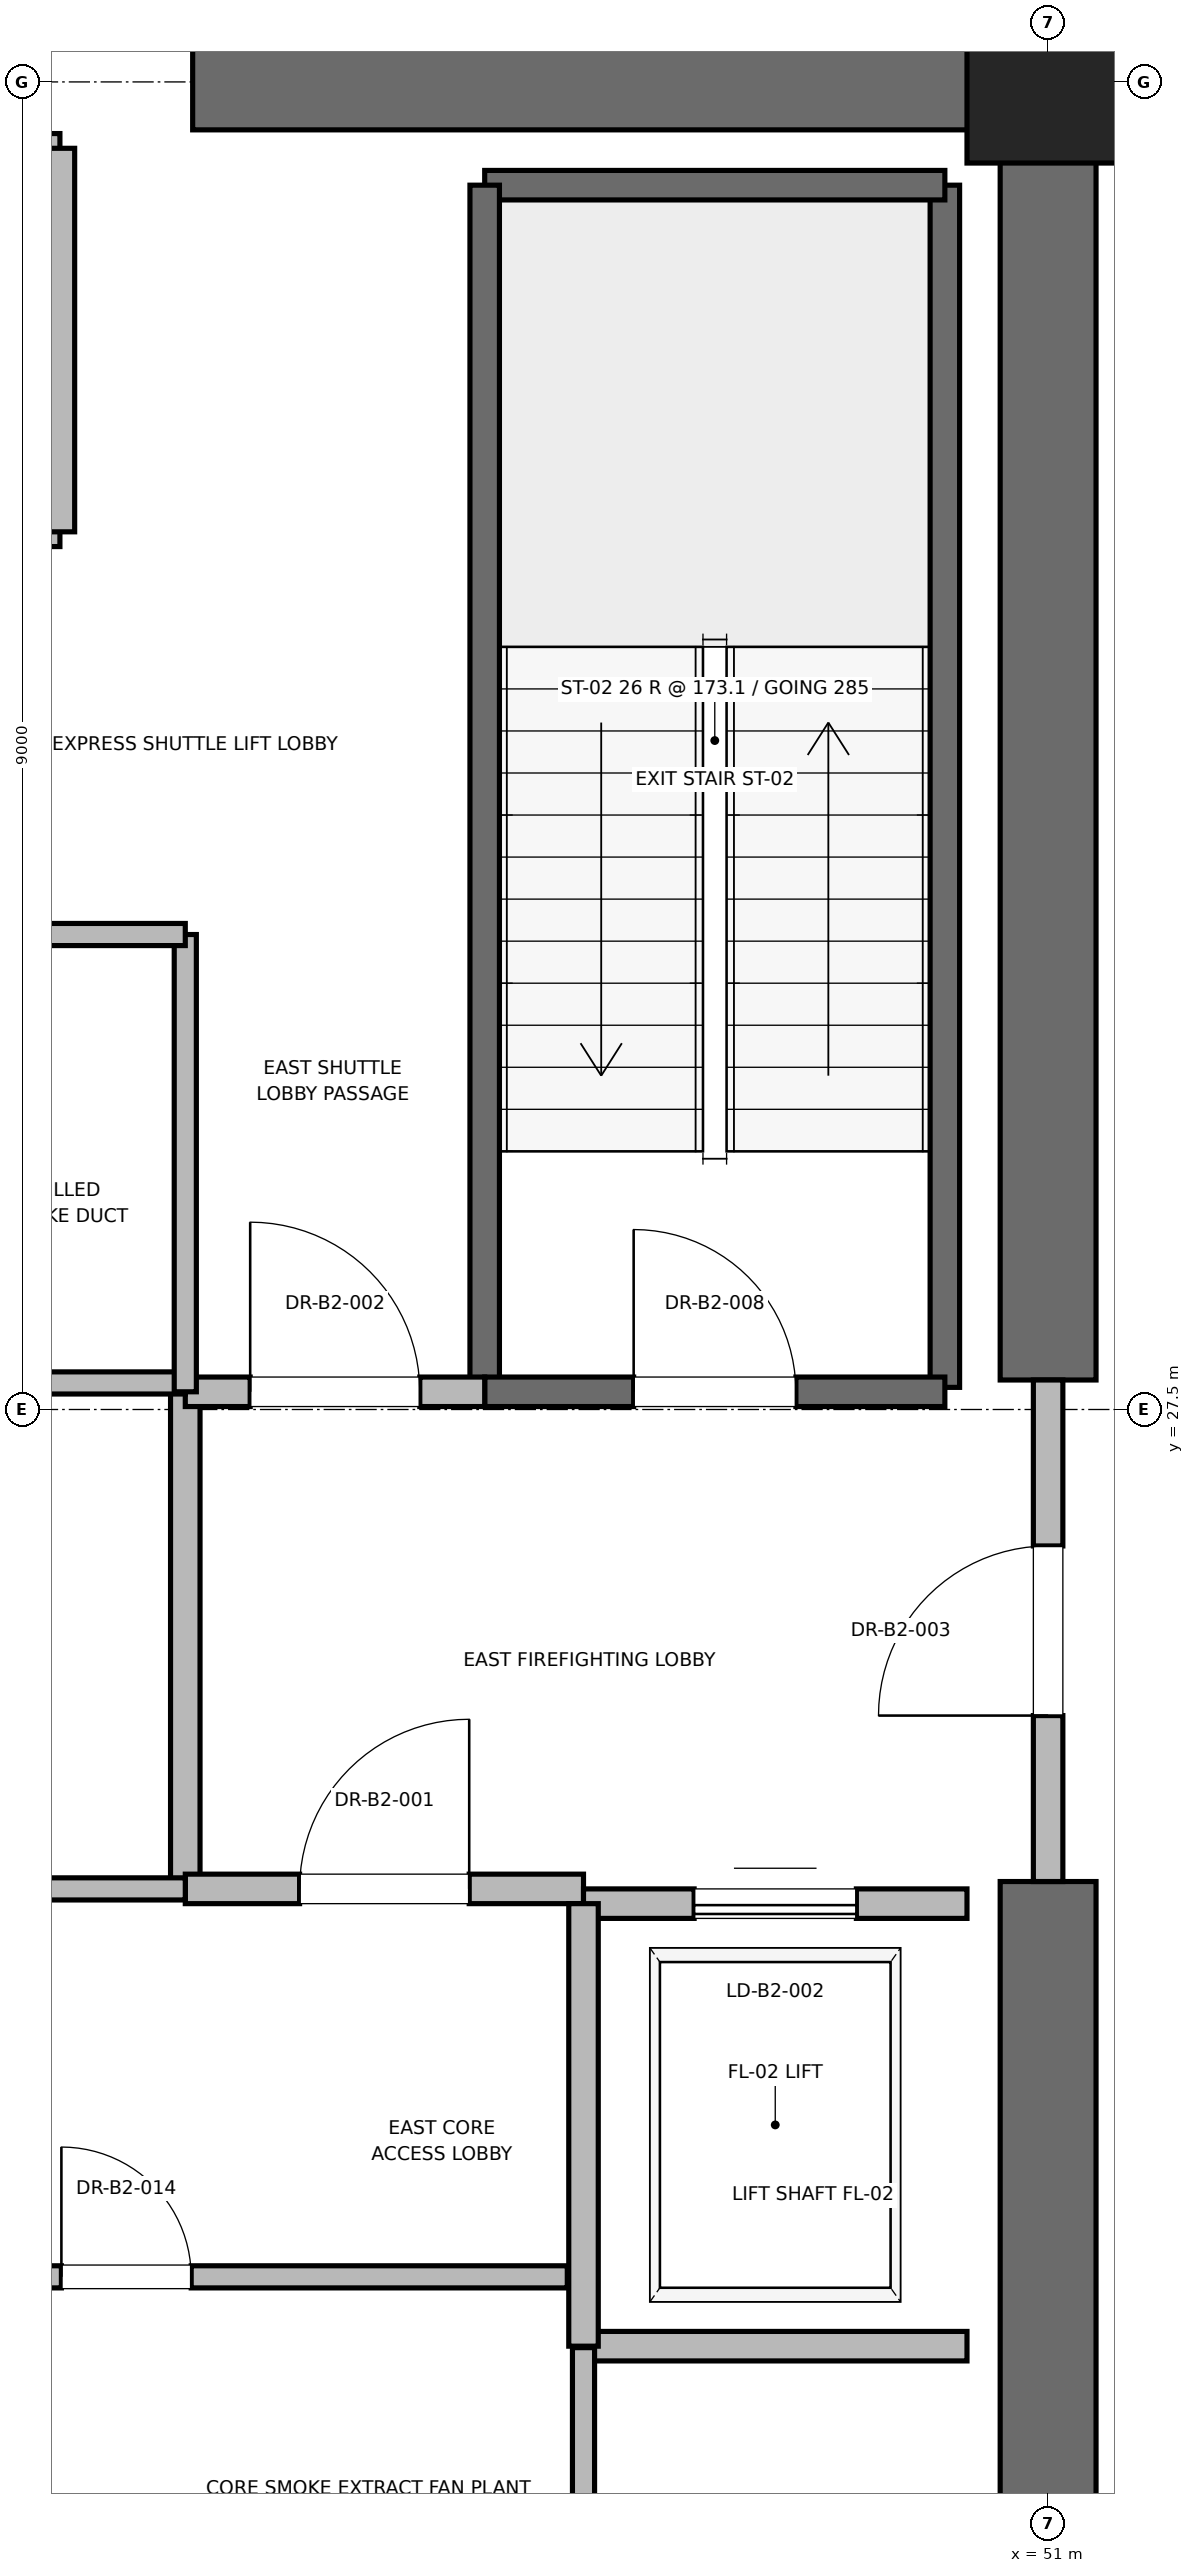
"""IFC4 building model, lengths in metres.
Left out: names, types, materials, properties, quantities, classifications, styles, units other than length and angle.
Written with IfcOpenShell. Run it as: python <this file> out.ifc"""

import sys

from ifc_helpers import new_model, si_unit, direction, frame, frame_2d, origin, origin_2d, place, context, subcontext, project, spatial, rectangle, extrude, element, fill, save


model = new_model("IFC4")
c1 = context("Model", 3, precision=1e-05, world=origin(), true_north=direction((0.0, 1.0)))
c2 = subcontext(c1, "Body", "Model", "MODEL_VIEW")
j1 = project(units=[si_unit("LENGTHUNIT", "METRE"), si_unit("PLANEANGLEUNIT", "RADIAN")], contexts=[c1])
p1 = place(None, origin())
s1 = spatial("IfcSite", under=j1, at=p1, CompositionType="ELEMENT")
p2 = place(p1, origin())
s2 = spatial("IfcBuilding", under=s1, at=p2, CompositionType="ELEMENT")
p3 = place(p2, frame((0.0, 0.0, -9.0)))
s3 = spatial("IfcBuildingStorey", under=s2, at=p3, CompositionType="ELEMENT", Elevation=-9.0)
p4 = place(p3, frame((51.0, 36.5, -0.3), z_axis=(0.0, 0.0, 1.0), x_axis=(1.0, 0.0, 0.0)))
e1 = element("IfcColumn", 1, at=p4, inside=s3, PredefinedType="PILASTER", context=c2, shape_type="SweptSolid", body=[
    extrude(rectangle(XDim=1.1, YDim=1.1, at=origin_2d()), origin(), (0.0, 0.0, 1.0), 4.8),
])
for number, where, z_axis, x_axis in (
    (2, (45.2, 36.5, -0.3), (0.0, 0.0, 1.0), (1.0, 0.0, 0.0)),
    (3, (51.0, 18.5, -0.3), (0.0, 0.0, 1.0), (0.0, 1.0, 0.0)),
):
    element("IfcWall", number, at=place(p3, frame(where, z_axis=z_axis, x_axis=x_axis)), inside=s3, PredefinedType="SHEAR", context=c2, shape_type="SweptSolid", body=[
        extrude(rectangle(XDim=5.8, YDim=0.65, at=frame_2d((2.9, 0.0))), origin(), (0.0, 0.0, 1.0), 4.5),
    ])
p5 = place(p3, frame((51.0, 27.7, -0.3), z_axis=(0.0, 0.0, 1.0), x_axis=(0.0, 1.0, 0.0)))
e4 = element("IfcWall", 4, at=p5, inside=s3, PredefinedType="SHEAR", context=c2, shape_type="SweptSolid", body=[
    extrude(rectangle(XDim=8.8, YDim=0.65, at=frame_2d((4.4, 0.0))), origin(), (0.0, 0.0, 1.0), 4.5),
])
p6 = place(p3, frame((50.3, 27.65, -0.3), z_axis=(0.0, 0.0, 1.0), x_axis=(0.0, 1.0, 0.0)))
e5 = element("IfcWall", 5, at=p6, inside=s3, PredefinedType="SOLIDWALL", context=c2, shape_type="SweptSolid", body=[
    extrude(rectangle(XDim=8.15, YDim=0.2, at=frame_2d((4.075, 0.0))), origin(), (0.0, 0.0, 1.0), 4.5),
])
p7 = place(p3, frame((47.18, 35.8, -0.3), z_axis=(0.0, 0.0, 1.0), x_axis=(1.0, 0.0, 0.0)))
e6 = element("IfcWall", 6, at=p7, inside=s3, PredefinedType="SOLIDWALL", context=c2, shape_type="SweptSolid", body=[
    extrude(rectangle(XDim=3.12, YDim=0.2, at=frame_2d((1.56, 0.0))), origin(), (0.0, 0.0, 1.0), 4.5),
])
p8 = place(p3, frame((47.18, 27.62, -0.3), z_axis=(0.0, 0.0, 1.0), x_axis=(0.0, 1.0, 0.0)))
e7 = element("IfcWall", 7, at=p8, inside=s3, PredefinedType="SOLIDWALL", context=c2, shape_type="SweptSolid", body=[
    extrude(rectangle(XDim=8.18, YDim=0.2, at=frame_2d((4.09, 0.0))), origin(), (0.0, 0.0, 1.0), 4.5),
])
p9 = place(p3, frame((47.18, 27.62, -0.3), z_axis=(0.0, 0.0, 1.0), x_axis=(1.0, 0.0, 0.0)))
e8 = element("IfcWall", 8, at=p9, inside=s3, PredefinedType="SOLIDWALL", context=c2, shape_type="SweptSolid", body=[
    extrude(rectangle(XDim=3.12, YDim=0.2, at=frame_2d((1.56, 0.0))), origin(), (0.0, 0.0, 1.0), 4.5),
])
p10 = place(p9, frame((1.01, 0.0, 0.3)))
e9 = element("IfcOpeningElement", 9, at=p10, cuts=e8, PredefinedType="OPENING", context=c2, shape_type="SweptSolid", body=[
    extrude(rectangle(XDim=1.1, YDim=2.15, at=frame_2d((0.55, 1.075))), frame((0.0, 0.1, 0.0), z_axis=(0.0, -1.0, 0.0), x_axis=(1.0, 0.0, 0.0)), (0.0, 0.0, 1.0), 0.2),
])
p11 = place(p3, frame((45.15, 24.25, 0.0), z_axis=(0.0, 0.0, 1.0), x_axis=(0.0, 1.0, 0.0)))
e10 = element("IfcWall", 10, at=p11, inside=s3, PredefinedType="PARTITIONING", context=c2, shape_type="SweptSolid", body=[
    extrude(rectangle(XDim=3.37, YDim=0.2, at=frame_2d((1.685, 0.0))), origin(), (0.0, 0.0, 1.0), 4.2),
])
p12 = place(p3, frame((45.15, 24.25, 0.0), z_axis=(0.0, 0.0, 1.0), x_axis=(1.0, 0.0, 0.0)))
e11 = element("IfcWall", 11, at=p12, inside=s3, PredefinedType="PARTITIONING", context=c2, shape_type="SweptSolid", body=[
    extrude(rectangle(XDim=2.7, YDim=0.2, at=frame_2d((1.35, 0.0))), origin(), (0.0, 0.0, 1.0), 4.2),
])
p13 = place(p12, frame((0.775, 0.0, 0.0)))
e12 = element("IfcOpeningElement", 12, at=p13, cuts=e11, PredefinedType="OPENING", context=c2, shape_type="SweptSolid", body=[
    extrude(rectangle(XDim=1.15, YDim=2.2, at=frame_2d((0.575, 1.1))), frame((0.0, 0.1, 0.0), z_axis=(0.0, -1.0, 0.0), x_axis=(1.0, 0.0, 0.0)), (0.0, 0.0, 1.0), 0.2),
])
p14 = place(p3, frame((45.15, 27.62, 0.0), z_axis=(0.0, 0.0, 1.0), x_axis=(1.0, 0.0, 0.0)))
e13 = element("IfcWall", 13, at=p14, inside=s3, PredefinedType="PARTITIONING", context=c2, shape_type="SweptSolid", body=[
    extrude(rectangle(XDim=2.03, YDim=0.2, at=frame_2d((1.015, 0.0))), origin(), (0.0, 0.0, 1.0), 4.2),
])
p15 = place(p14, frame((0.44, 0.0, 0.0)))
e14 = element("IfcOpeningElement", 14, at=p15, cuts=e13, PredefinedType="OPENING", context=c2, shape_type="SweptSolid", body=[
    extrude(rectangle(XDim=1.15, YDim=2.2, at=frame_2d((0.575, 1.1))), frame((0.0, 0.1, 0.0), z_axis=(0.0, -1.0, 0.0), x_axis=(1.0, 0.0, 0.0)), (0.0, 0.0, 1.0), 0.2),
])
p16 = place(p3, frame((51.0, 24.3, 0.0), z_axis=(0.0, 0.0, 1.0), x_axis=(0.0, 1.0, 0.0)))
e15 = element("IfcWall", 15, at=p16, inside=s3, PredefinedType="PARTITIONING", context=c2, shape_type="SweptSolid", body=[
    extrude(rectangle(XDim=3.4, YDim=0.2, at=frame_2d((1.7, 0.0))), origin(), (0.0, 0.0, 1.0), 2.98),
])
p17 = place(p16, frame((1.125, 0.0, 0.0)))
e16 = element("IfcOpeningElement", 16, at=p17, cuts=e15, PredefinedType="OPENING", context=c2, shape_type="SweptSolid", body=[
    extrude(rectangle(XDim=1.15, YDim=2.2, at=frame_2d((0.575, 1.1))), frame((0.0, 0.1, 0.0), z_axis=(0.0, -1.0, 0.0), x_axis=(1.0, 0.0, 0.0)), (0.0, 0.0, 1.0), 0.2),
])
p18 = place(p3, frame((47.85, 21.15, 0.0), z_axis=(0.0, 0.0, 1.0), x_axis=(1.0, 0.0, 0.0)))
e17 = element("IfcWall", 17, at=p18, inside=s3, PredefinedType="SOLIDWALL", context=c2, shape_type="SweptSolid", body=[
    extrude(rectangle(XDim=2.6, YDim=0.2, at=frame_2d((1.3, 0.0))), origin(), (0.0, 0.0, 1.0), 4.2),
])
p19 = place(p3, frame((50.45, 24.15, 0.0), z_axis=(0.0, 0.0, 1.0), x_axis=(-1.0, 0.0, 0.0)))
e18 = element("IfcWall", 18, at=p19, inside=s3, PredefinedType="SOLIDWALL", context=c2, shape_type="SweptSolid", body=[
    extrude(rectangle(XDim=2.6, YDim=0.2, at=frame_2d((1.3, 0.0))), origin(), (0.0, 0.0, 1.0), 2.98),
])
p20 = place(p19, frame((0.75, 0.0, 0.0)))
e19 = element("IfcOpeningElement", 19, at=p20, cuts=e18, PredefinedType="OPENING", context=c2, shape_type="SweptSolid", body=[
    extrude(rectangle(XDim=1.1, YDim=2.2, at=frame_2d((0.55, 1.1))), frame((0.0, 0.1, 0.0), z_axis=(0.0, -1.0, 0.0), x_axis=(1.0, 0.0, 0.0)), (0.0, 0.0, 1.0), 0.2),
])
p21 = place(p3, frame((47.85, 24.15, 0.0), z_axis=(0.0, 0.0, 1.0), x_axis=(0.0, -1.0, 0.0)))
e20 = element("IfcWall", 20, at=p21, inside=s3, PredefinedType="SOLIDWALL", context=c2, shape_type="SweptSolid", body=[
    extrude(rectangle(XDim=3.0, YDim=0.2, at=frame_2d((1.5, 0.0))), origin(), (0.0, 0.0, 1.0), 4.2),
])
p22 = place(p3, frame((42.0, 33.45, 0.0), z_axis=(0.0, 0.0, 1.0), x_axis=(1.0, 0.0, 0.0)))
e21 = element("IfcWall", 21, at=p22, inside=s3, PredefinedType="SOLIDWALL", context=c2, shape_type="SweptSolid", body=[
    extrude(rectangle(XDim=2.3, YDim=0.2, at=frame_2d((1.15, 0.0))), origin(), (0.0, 0.0, 1.0), 4.2),
])
p23 = place(p22, frame((0.6, 0.0, 0.0)))
e22 = element("IfcOpeningElement", 22, at=p23, cuts=e21, PredefinedType="OPENING", context=c2, shape_type="SweptSolid", body=[
    extrude(rectangle(XDim=1.1, YDim=2.2, at=frame_2d((0.55, 1.1))), frame((0.0, 0.1, 0.0), z_axis=(0.0, -1.0, 0.0), x_axis=(1.0, 0.0, 0.0)), (0.0, 0.0, 1.0), 0.2),
])
p24 = place(p3, frame((44.3, 36.05, 0.0), z_axis=(0.0, 0.0, 1.0), x_axis=(-1.0, 0.0, 0.0)))
e23 = element("IfcWall", 23, at=p24, inside=s3, PredefinedType="SOLIDWALL", context=c2, shape_type="SweptSolid", body=[
    extrude(rectangle(XDim=2.3, YDim=0.2, at=frame_2d((1.15, 0.0))), origin(), (0.0, 0.0, 1.0), 2.98),
])
p25 = place(p3, frame((44.3, 33.45, 0.0), z_axis=(0.0, 0.0, 1.0), x_axis=(0.0, 1.0, 0.0)))
e24 = element("IfcWall", 24, at=p25, inside=s3, PredefinedType="SOLIDWALL", context=c2, shape_type="SweptSolid", body=[
    extrude(rectangle(XDim=2.6, YDim=0.2, at=frame_2d((1.3, 0.0))), origin(), (0.0, 0.0, 1.0), 2.98),
])
p26 = place(p3, frame((41.56, 27.68, 0.0), z_axis=(0.0, 0.0, 1.0), x_axis=(1.0, 0.0, 0.0)))
e25 = element("IfcWall", 25, at=p26, inside=s3, PredefinedType="PARTITIONING", context=c2, shape_type="SweptSolid", body=[
    extrude(rectangle(XDim=3.59, YDim=0.15, at=frame_2d((1.795, 0.0))), origin(), (0.0, 0.0, 1.0), 2.85),
])
p27 = place(p3, frame((47.85, 18.6, 0.0), z_axis=(0.0, 0.0, 1.0), x_axis=(0.0, 1.0, 0.0)))
e26 = element("IfcWall", 26, at=p27, inside=s3, PredefinedType="PARTITIONING", context=c2, shape_type="SweptSolid", body=[
    extrude(rectangle(XDim=2.54, YDim=0.15, at=frame_2d((1.27, 0.0))), origin(), (0.0, 0.0, 1.0), 2.85),
])
p28 = place(p3, frame((41.76, 21.62, 0.0), z_axis=(0.0, 0.0, 1.0), x_axis=(1.0, 0.0, 0.0)))
e27 = element("IfcWall", 27, at=p28, inside=s3, PredefinedType="PARTITIONING", context=c2, shape_type="SweptSolid", body=[
    extrude(rectangle(XDim=5.98, YDim=0.15, at=frame_2d((2.99, 0.0))), origin(), (0.0, 0.0, 1.0), 2.85),
])
p29 = place(p28, frame((2.55, 0.0, 0.0)))
e28 = element("IfcOpeningElement", 28, at=p29, cuts=e27, PredefinedType="OPENING", context=c2, shape_type="SweptSolid", body=[
    extrude(rectangle(XDim=0.88, YDim=2.1, at=frame_2d((0.44, 1.05))), frame((0.0, 0.075, 0.0), z_axis=(0.0, -1.0, 0.0), x_axis=(1.0, 0.0, 0.0)), (0.0, 0.0, 1.0), 0.15),
])
p30 = place(p3, frame((41.76, 24.25, 0.0), z_axis=(0.0, 0.0, 1.0), x_axis=(1.0, 0.0, 0.0)))
e29 = element("IfcWall", 29, at=p30, inside=s3, PredefinedType="PARTITIONING", context=c2, shape_type="SweptSolid", body=[
    extrude(rectangle(XDim=3.39, YDim=0.15, at=frame_2d((1.695, 0.0))), origin(), (0.0, 0.0, 1.0), 2.85),
])
p31 = place(p30, frame((1.255, 0.0, 0.0)))
e30 = element("IfcOpeningElement", 30, at=p31, cuts=e29, PredefinedType="OPENING", context=c2, shape_type="SweptSolid", body=[
    extrude(rectangle(XDim=0.88, YDim=2.1, at=frame_2d((0.44, 1.05))), frame((0.0, 0.075, 0.0), z_axis=(0.0, -1.0, 0.0), x_axis=(1.0, 0.0, 0.0)), (0.0, 0.0, 1.0), 0.15),
])
p32 = place(p3, frame((45.15, 27.62, 0.0), z_axis=(0.0, 0.0, 1.0), x_axis=(0.0, 1.0, 0.0)))
e31 = element("IfcWall", 31, at=p32, inside=s3, PredefinedType="PARTITIONING", context=c2, shape_type="SweptSolid", body=[
    extrude(rectangle(XDim=3.1, YDim=0.15, at=frame_2d((1.55, 0.0))), origin(), (0.0, 0.0, 1.0), 2.85),
])
p33 = place(p3, frame((41.56, 30.72, 0.0), z_axis=(0.0, 0.0, 1.0), x_axis=(1.0, 0.0, 0.0)))
e32 = element("IfcWall", 32, at=p33, inside=s3, PredefinedType="PARTITIONING", context=c2, shape_type="SweptSolid", body=[
    extrude(rectangle(XDim=3.59, YDim=0.15, at=frame_2d((1.795, 0.0))), origin(), (0.0, 0.0, 1.0), 2.85),
])
p34 = place(p33, frame((1.355, 0.0, 0.0)))
e33 = element("IfcOpeningElement", 33, at=p34, cuts=e32, PredefinedType="OPENING", context=c2, shape_type="SweptSolid", body=[
    extrude(rectangle(XDim=0.88, YDim=2.1, at=frame_2d((0.44, 1.05))), frame((0.0, 0.075, 0.0), z_axis=(0.0, -1.0, 0.0), x_axis=(1.0, 0.0, 0.0)), (0.0, 0.0, 1.0), 0.15),
])
p35 = place(p10, origin())
e34 = element("IfcDoor", 34, at=p35, inside=s3, OperationType="SINGLE_SWING_LEFT", PredefinedType="DOOR", context=c2, shape_type="SweptSolid", body=[
    extrude(rectangle(XDim=1.1, YDim=2.15, at=frame_2d((0.55, 1.075))), frame((0.0, 0.025, 0.0), z_axis=(0.0, -1.0, 0.0), x_axis=(1.0, 0.0, 0.0)), (0.0, 0.0, 1.0), 0.05),
])
fill(e9, e34)
p36 = place(p13, origin())
e35 = element("IfcDoor", 35, at=p36, inside=s3, OperationType="SINGLE_SWING_RIGHT", PredefinedType="DOOR", context=c2, shape_type="SweptSolid", body=[
    extrude(rectangle(XDim=1.15, YDim=2.2, at=frame_2d((0.575, 1.1))), frame((0.0, 0.025, 0.0), z_axis=(0.0, -1.0, 0.0), x_axis=(1.0, 0.0, 0.0)), (0.0, 0.0, 1.0), 0.05),
])
fill(e12, e35)
p37 = place(p15, origin())
e36 = element("IfcDoor", 36, at=p37, inside=s3, OperationType="SINGLE_SWING_LEFT", PredefinedType="DOOR", context=c2, shape_type="SweptSolid", body=[
    extrude(rectangle(XDim=1.15, YDim=2.2, at=frame_2d((0.575, 1.1))), frame((0.0, 0.025, 0.0), z_axis=(0.0, -1.0, 0.0), x_axis=(1.0, 0.0, 0.0)), (0.0, 0.0, 1.0), 0.05),
])
fill(e14, e36)
p38 = place(p17, origin())
e37 = element("IfcDoor", 37, at=p38, inside=s3, OperationType="SINGLE_SWING_LEFT", PredefinedType="DOOR", context=c2, shape_type="SweptSolid", body=[
    extrude(rectangle(XDim=1.15, YDim=2.2, at=frame_2d((0.575, 1.1))), frame((0.0, 0.025, 0.0), z_axis=(0.0, -1.0, 0.0), x_axis=(1.0, 0.0, 0.0)), (0.0, 0.0, 1.0), 0.05),
])
fill(e16, e37)
p39 = place(p20, origin())
e38 = element("IfcDoor", 38, at=p39, inside=s3, OperationType="SLIDING_TO_RIGHT", PredefinedType="DOOR", context=c2, shape_type="SweptSolid", body=[
    extrude(rectangle(XDim=1.1, YDim=2.2, at=frame_2d((0.55, 1.1))), frame((0.0, 0.025, 0.0), z_axis=(0.0, -1.0, 0.0), x_axis=(1.0, 0.0, 0.0)), (0.0, 0.0, 1.0), 0.05),
])
fill(e19, e38)
p40 = place(p29, origin())
e39 = element("IfcDoor", 39, at=p40, inside=s3, OperationType="SINGLE_SWING_LEFT", PredefinedType="DOOR", context=c2, shape_type="SweptSolid", body=[
    extrude(rectangle(XDim=0.88, YDim=2.1, at=frame_2d((0.44, 1.05))), frame((0.0, 0.025, 0.0), z_axis=(0.0, -1.0, 0.0), x_axis=(1.0, 0.0, 0.0)), (0.0, 0.0, 1.0), 0.05),
])
fill(e28, e39)
save(model, sys.argv[1])
